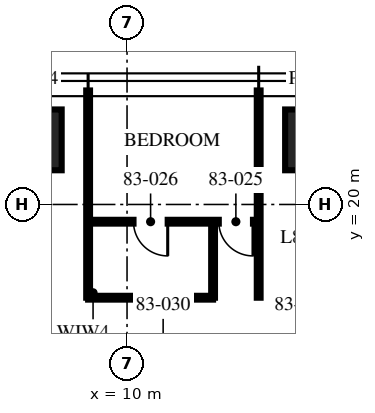
"""IFC4 building model, lengths in metres.
Left out: names, types, materials, properties, quantities, classifications, styles, units other than length and angle.
Written with IfcOpenShell. Run it as: python <this file> out.ifc"""

import sys

from ifc_helpers import new_model, si_unit, direction, frame, frame_2d, origin, origin_2d, place, context, subcontext, project, spatial, rectangle, extrude, element, fill, save


model = new_model("IFC4")
c1 = context("Model", 3, precision=1e-05, world=origin(), true_north=direction((0.0, 1.0)))
c2 = subcontext(c1, "Body", "Model", "MODEL_VIEW")
j1 = project(units=[si_unit("LENGTHUNIT", "METRE"), si_unit("PLANEANGLEUNIT", "RADIAN")], contexts=[c1])
p1 = place(None, origin())
s1 = spatial("IfcSite", under=j1, at=p1, CompositionType="ELEMENT")
p2 = place(p1, origin())
s2 = spatial("IfcBuilding", under=s1, at=p2, CompositionType="ELEMENT")
p3 = place(p2, frame((0.0, 0.0, 330.75)))
s3 = spatial("IfcBuildingStorey", under=s2, at=p3, CompositionType="ELEMENT", Elevation=330.75)
for number, where, z_axis, x_axis in (
    (1, (7.48, 21.7, 0.0), (0.0, 0.0, 1.0), (1.0, 0.0, 0.0)),
    (2, (14.96, 21.7, 0.0), (0.0, 0.0, 1.0), (1.0, 0.0, 0.0)),
):
    element("IfcColumn", number, at=place(p3, frame(where, z_axis=z_axis, x_axis=x_axis)), inside=s3, PredefinedType="COLUMN", context=c2, shape_type="SweptSolid", body=[
        extrude(rectangle(XDim=1.6, YDim=1.6, at=origin_2d()), origin(), (0.0, 0.0, 1.0), 3.75),
    ])
for number, where, z_axis, x_axis in (
    (3, (13.464, 17.546, 0.0), (0.0, 0.0, 1.0), (0.0, 1.0, 0.0)),
    (4, (8.976, 17.546, 0.0), (0.0, 0.0, 1.0), (0.0, 1.0, 0.0)),
):
    element("IfcWall", number, at=place(p3, frame(where, z_axis=z_axis, x_axis=x_axis)), inside=s3, PredefinedType="PARTITIONING", context=c2, shape_type="SweptSolid", body=[
        extrude(rectangle(XDim=5.454, YDim=0.1, at=frame_2d((2.727, 0.0))), origin(), (0.0, 0.0, 1.0), 3.01),
    ])
p4 = place(p3, frame((13.464, 19.546, 0.0), z_axis=(0.0, 0.0, 1.0), x_axis=(-1.0, 0.0, 0.0)))
e5 = element("IfcWall", 5, at=p4, inside=s3, PredefinedType="PARTITIONING", context=c2, shape_type="SweptSolid", body=[
    extrude(rectangle(XDim=4.488, YDim=0.1, at=frame_2d((2.244, 0.0))), origin(), (0.0, 0.0, 1.0), 2.91),
])
p5 = place(p4, frame((0.15, 0.0, 0.0)))
e6 = element("IfcOpeningElement", 6, at=p5, cuts=e5, PredefinedType="OPENING", context=c2, shape_type="SweptSolid", body=[
    extrude(rectangle(XDim=0.9, YDim=2.1, at=frame_2d((0.45, 1.05))), frame((0.0, 0.06, 0.0), z_axis=(0.0, -1.0, 0.0), x_axis=(1.0, 0.0, 0.0)), (0.0, 0.0, 1.0), 0.12),
])
p6 = place(p4, frame((2.394, 0.0, 0.0)))
e7 = element("IfcOpeningElement", 7, at=p6, cuts=e5, PredefinedType="OPENING", context=c2, shape_type="SweptSolid", body=[
    extrude(rectangle(XDim=0.9, YDim=2.1, at=frame_2d((0.45, 1.05))), frame((0.0, 0.06, 0.0), z_axis=(0.0, -1.0, 0.0), x_axis=(1.0, 0.0, 0.0)), (0.0, 0.0, 1.0), 0.12),
])
p7 = place(p3, frame((12.264, 17.546, 0.0), z_axis=(0.0, 0.0, 1.0), x_axis=(0.0, 1.0, 0.0)))
e8 = element("IfcWall", 8, at=p7, inside=s3, PredefinedType="PARTITIONING", context=c2, shape_type="SweptSolid", body=[
    extrude(rectangle(XDim=2.0, YDim=0.1, at=frame_2d((1.0, 0.0))), origin(), (0.0, 0.0, 1.0), 3.5),
])
p8 = place(p3, frame((12.264, 17.546, 0.0), z_axis=(0.0, 0.0, 1.0), x_axis=(-1.0, 0.0, 0.0)))
e9 = element("IfcWall", 9, at=p8, inside=s3, PredefinedType="PARTITIONING", context=c2, shape_type="SweptSolid", body=[
    extrude(rectangle(XDim=3.288, YDim=0.1, at=frame_2d((1.644, 0.0))), origin(), (0.0, 0.0, 1.0), 2.91),
])
p9 = place(p5, origin())
e10 = element("IfcDoor", 10, at=p9, inside=s3, OperationType="SINGLE_SWING_LEFT", PredefinedType="DOOR", context=c2, shape_type="SweptSolid", body=[
    extrude(rectangle(XDim=0.9, YDim=2.1, at=frame_2d((0.45, 1.05))), frame((0.0, 0.025, 0.0), z_axis=(0.0, -1.0, 0.0), x_axis=(1.0, 0.0, 0.0)), (0.0, 0.0, 1.0), 0.05),
])
fill(e6, e10)
p10 = place(p6, origin())
e11 = element("IfcDoor", 11, at=p10, inside=s3, OperationType="SINGLE_SWING_LEFT", PredefinedType="DOOR", context=c2, shape_type="SweptSolid", body=[
    extrude(rectangle(XDim=0.9, YDim=2.1, at=frame_2d((0.45, 1.05))), frame((0.0, 0.025, 0.0), z_axis=(0.0, -1.0, 0.0), x_axis=(1.0, 0.0, 0.0)), (0.0, 0.0, 1.0), 0.05),
])
fill(e7, e11)
save(model, sys.argv[1])
